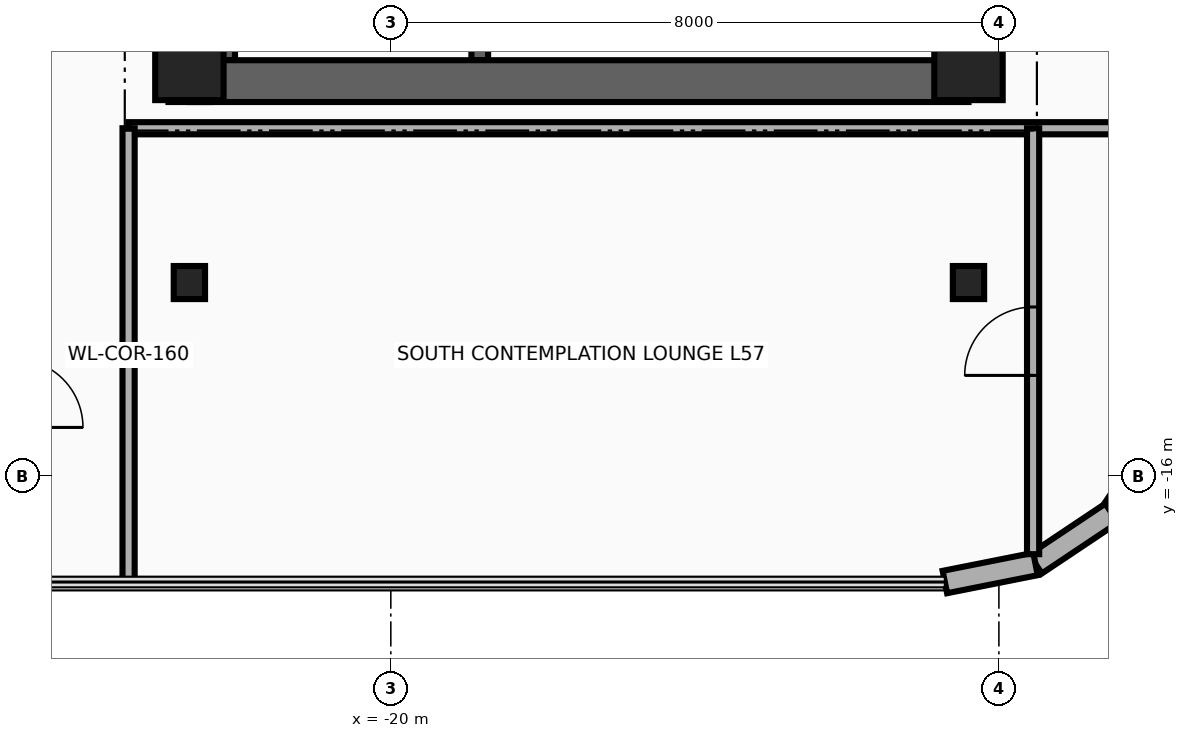
"""IFC4 building model, lengths in metres.
Left out: names, types, materials, properties, quantities, classifications, styles, units other than length and angle.
Written with IfcOpenShell. Run it as: python <this file> out.ifc"""

import sys

from ifc_helpers import new_model, si_unit, direction, frame, frame_2d, origin, origin_2d, place, context, subcontext, project, spatial, rectangle, i_section, extrude, source, transform, mapped, element, fill, save


model = new_model("IFC4")
c1 = context("Model", 3, precision=1e-05, world=origin(), true_north=direction((0.0, 1.0)))
c2 = subcontext(c1, "Body", "Model", "MODEL_VIEW")
j1 = project(units=[si_unit("LENGTHUNIT", "METRE"), si_unit("PLANEANGLEUNIT", "RADIAN")], contexts=[c1])
p1 = place(None, origin())
s1 = spatial("IfcSite", under=j1, at=p1, CompositionType="ELEMENT")
p2 = place(p1, origin())
s2 = spatial("IfcBuilding", under=s1, at=p2, CompositionType="ELEMENT")
p3 = place(p2, frame((0.0, 0.0, 223.0)))
s3 = spatial("IfcBuildingStorey", under=s2, at=p3, CompositionType="ELEMENT", Elevation=223.0)
for number, where, z_axis, x_axis in (
    (1, (-22.16, -10.525, 0.0), (0.0, 0.0, 1.0), (0.0, 1.0, 0.0)),
    (2, (-18.83, -10.525, 0.0), (0.0, 0.0, 1.0), (0.0, 1.0, 0.0)),
):
    element("IfcWall", number, at=place(p3, frame(where, z_axis=z_axis, x_axis=x_axis)), inside=s3, PredefinedType="SHEAR", context=c2, shape_type="SweptSolid", body=[
        extrude(rectangle(XDim=8.745, YDim=0.22, at=frame_2d((4.373, 0.0))), origin(), (0.0, 0.0, 1.0), 3.26),
    ])
p4 = place(p3, frame((-22.65, -11.075, 0.0), z_axis=(0.0, 0.0, 1.0), x_axis=(0.0, 1.0, 0.0)))
e3 = element("IfcWall", 3, at=p4, inside=s3, PredefinedType="SHEAR", context=c2, shape_type="SweptSolid", body=[
    extrude(rectangle(XDim=22.15, YDim=0.55, at=frame_2d((11.075, 0.0))), origin(), (0.0, 0.0, 1.0), 3.26),
])
p5 = place(p3, frame((-22.65, -10.8, 0.0), z_axis=(0.0, 0.0, 1.0), x_axis=(1.0, 0.0, 0.0)))
e4 = element("IfcWall", 4, at=p5, inside=s3, PredefinedType="SHEAR", context=c2, shape_type="SweptSolid", body=[
    extrude(rectangle(XDim=10.25, YDim=0.55, at=frame_2d((5.125, 0.0))), origin(), (0.0, 0.0, 1.0), 3.26),
])
m1 = source(origin(), c2, "Body", "SweptSolid", [
    extrude(rectangle(XDim=0.9, YDim=0.9, at=origin_2d()), origin(), (0.0, 0.0, 1.0), 3.5),
])
for number, where, z_axis, x_axis in (
    (5, (-22.65, -10.6, 0.0), (0.0, 0.0, 1.0), (1.0, 0.0, 0.0)),
    (6, (-12.4, -10.6, 0.0), (0.0, 0.0, 1.0), (1.0, 0.0, 0.0)),
):
    element("IfcColumn", number, at=place(p3, frame(where, z_axis=z_axis, x_axis=x_axis)), inside=s3, PredefinedType="COLUMN", context=c2, shape_type="MappedRepresentation", body=[
        mapped(m1, transform((0.0, 0.0, 0.0), x_axis=(1.0, 0.0, 0.0), y_axis=(0.0, 1.0, 0.0), z_axis=(0.0, 0.0, 1.0), scale=1.0)),
    ])
m2 = source(origin(), c2, "Body", "SweptSolid", [
    extrude(i_section(OverallWidth=0.412, OverallDepth=0.435, WebThickness=0.036, FlangeThickness=0.057, at=origin_2d()), origin(), (0.0, 0.0, 1.0), 3.5),
])
for number, where, z_axis, x_axis in (
    (7, (-22.65, -13.45, 0.0), (0.0, 0.0, 1.0), (1.0, 0.0, 0.0)),
    (8, (-12.4, -13.45, 0.0), (0.0, 0.0, 1.0), (1.0, 0.0, 0.0)),
):
    element("IfcColumn", number, at=place(p3, frame(where, z_axis=z_axis, x_axis=x_axis)), inside=s3, PredefinedType="COLUMN", context=c2, shape_type="MappedRepresentation", body=[
        mapped(m2, transform((0.0, 0.0, 0.0), x_axis=(1.0, 0.0, 0.0), y_axis=(0.0, 1.0, 0.0), z_axis=(0.0, 0.0, 1.0), scale=1.0)),
    ])
for number, where, z_axis, x_axis in (
    (9, (-9.847, -15.482, 0.0), (0.0, 0.0, 1.0), (-0.556, -0.831, 0.0)),
    (10, (-10.517, -16.483, 0.0), (0.0, 0.0, 1.0), (-0.831, -0.556, 0.0)),
):
    element("IfcWall", number, at=place(p3, frame(where, z_axis=z_axis, x_axis=x_axis)), inside=s3, PredefinedType="SOLIDWALL", context=c2, shape_type="SweptSolid", body=[
        extrude(rectangle(XDim=1.205, YDim=0.3, at=frame_2d((0.603, 0.0))), origin(), (0.0, 0.0, 1.0), 3.26),
    ])
p6 = place(p3, frame((-11.518, -17.153, 0.0), z_axis=(0.0, 0.0, 1.0), x_axis=(-0.980804027463, -0.194996050505, 0.0)))
e11 = element("IfcWall", 11, at=p6, inside=s3, PredefinedType="SOLIDWALL", context=c2, shape_type="SweptSolid", body=[
    extrude(rectangle(XDim=1.216, YDim=0.3, at=frame_2d((0.608, 0.0))), origin(), (0.0, 0.0, 1.0), 3.26),
])
p7 = place(p3, frame((-23.45, -11.42, 0.0), z_axis=(0.0, 0.0, 1.0), x_axis=(1.0, 0.0, 0.0)))
e12 = element("IfcWall", 12, at=p7, inside=s3, PredefinedType="PARTITIONING", context=c2, shape_type="SweptSolid", body=[
    extrude(rectangle(XDim=13.84, YDim=0.16, at=frame_2d((6.92, 0.0))), origin(), (0.0, 0.0, 1.0), 2.634),
])
p8 = place(p3, frame((-23.45, -17.39, 0.0), z_axis=(0.0, 0.0, 1.0), x_axis=(0.0, 1.0, 0.0)))
e13 = element("IfcWall", 13, at=p8, inside=s3, PredefinedType="PARTITIONING", context=c2, shape_type="SweptSolid", body=[
    extrude(rectangle(XDim=5.97, YDim=0.16, at=frame_2d((2.985, 0.0))), origin(), (0.0, 0.0, 1.0), 3.26),
])
p9 = place(p3, frame((-11.55, -17.024, 0.0), z_axis=(0.0, 0.0, 1.0), x_axis=(0.0, 1.0, 0.0)))
e14 = element("IfcWall", 14, at=p9, inside=s3, PredefinedType="PARTITIONING", context=c2, shape_type="SweptSolid", body=[
    extrude(rectangle(XDim=5.604, YDim=0.16, at=frame_2d((2.802, 0.0))), origin(), (0.0, 0.0, 1.0), 3.26),
])
p10 = place(p9, frame((2.352, 0.0, 0.0)))
e15 = element("IfcOpeningElement", 15, at=p10, cuts=e14, PredefinedType="OPENING", context=c2, shape_type="SweptSolid", body=[
    extrude(rectangle(XDim=0.9, YDim=2.1, at=frame_2d((0.45, 1.05))), frame((0.0, 0.095, 0.0), z_axis=(0.0, -1.0, 0.0), x_axis=(1.0, 0.0, 0.0)), (0.0, 0.0, 1.0), 0.19),
])
p11 = place(p10, origin())
e16 = element("IfcDoor", 16, at=p11, inside=s3, OperationType="SINGLE_SWING_RIGHT", PredefinedType="DOOR", context=c2, shape_type="SweptSolid", body=[
    extrude(rectangle(XDim=0.9, YDim=2.1, at=frame_2d((0.45, 1.05))), frame((0.0, 0.025, 0.0), z_axis=(0.0, -1.0, 0.0), x_axis=(1.0, 0.0, 0.0)), (0.0, 0.0, 1.0), 0.05),
])
fill(e15, e16)
save(model, sys.argv[1])
